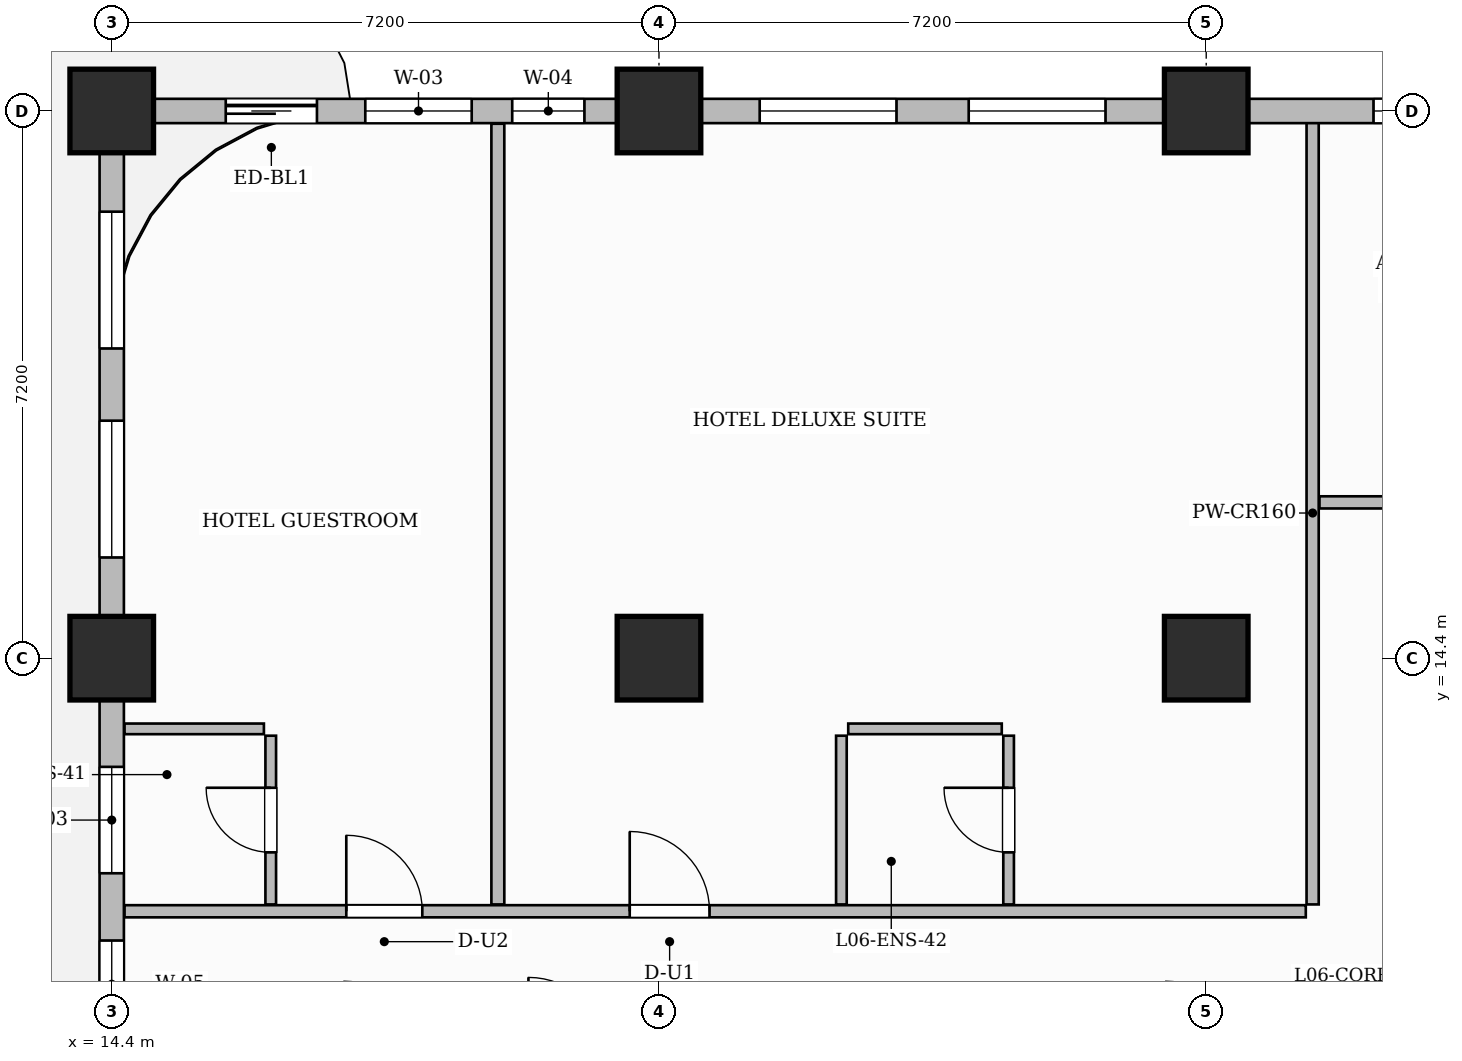
"""IFC4 building model, lengths in metres.
Left out: names, types, materials, properties, quantities, classifications, styles, units other than length and angle.
Written with IfcOpenShell. Run it as: python <this file> out.ifc"""

import sys

from ifc_helpers import new_model, si_unit, direction, frame, frame_2d, origin, origin_2d, place, context, subcontext, project, spatial, rectangle, extrude, source, transform, mapped, element, fill, save


model = new_model("IFC4")
c1 = context("Model", 3, precision=1e-05, world=origin(), true_north=direction((0.0, 1.0)))
c2 = subcontext(c1, "Body", "Model", "MODEL_VIEW")
j1 = project(units=[si_unit("LENGTHUNIT", "METRE"), si_unit("PLANEANGLEUNIT", "RADIAN")], contexts=[c1])
p1 = place(None, origin())
s1 = spatial("IfcSite", under=j1, at=p1, CompositionType="ELEMENT")
p2 = place(p1, origin())
s2 = spatial("IfcBuilding", under=s1, at=p2, CompositionType="ELEMENT")
p3 = place(p2, frame((0.0, 0.0, 32.4)))
s3 = spatial("IfcBuildingStorey", under=s2, at=p3, CompositionType="ELEMENT", Elevation=32.4)
m1 = source(origin(), c2, "Body", "SweptSolid", [
    extrude(rectangle(XDim=1.1, YDim=1.1, at=origin_2d()), origin(), (0.0, 0.0, 1.0), 3.7),
])
for number, where, z_axis, x_axis in (
    (1, (14.4, 14.4, 0.0), (0.0, 0.0, 1.0), (1.0, 0.0, 0.0)),
    (2, (14.4, 21.6, 0.0), (0.0, 0.0, 1.0), (1.0, 0.0, 0.0)),
    (3, (21.6, 14.4, 0.0), (0.0, 0.0, 1.0), (1.0, 0.0, 0.0)),
    (4, (21.6, 21.6, 0.0), (0.0, 0.0, 1.0), (1.0, 0.0, 0.0)),
    (5, (28.8, 14.4, 0.0), (0.0, 0.0, 1.0), (1.0, 0.0, 0.0)),
    (6, (28.8, 21.6, 0.0), (0.0, 0.0, 1.0), (1.0, 0.0, 0.0)),
):
    element("IfcColumn", number, at=place(p3, frame(where, z_axis=z_axis, x_axis=x_axis)), inside=s3, PredefinedType="COLUMN", context=c2, shape_type="MappedRepresentation", body=[
        mapped(m1, transform((0.0, 0.0, 0.0), scale=1.0)),
    ])
p4 = place(p3, frame((14.568, 11.07, 0.0), z_axis=(0.0, 0.0, 1.0), x_axis=(1.0, 0.0, 0.0)))
e7 = element("IfcWall", 7, at=p4, inside=s3, PredefinedType="PARTITIONING", context=c2, shape_type="SweptSolid", body=[
    extrude(rectangle(XDim=15.542, YDim=0.16, at=frame_2d((7.771, 0.0))), origin(), (0.0, 0.0, 1.0), 3.45),
])
p5 = place(p4, frame((2.918, 0.0, 0.0)))
e8 = element("IfcOpeningElement", 8, at=p5, cuts=e7, PredefinedType="OPENING", context=c2, shape_type="SweptSolid", body=[
    extrude(rectangle(XDim=1.0, YDim=2.2, at=frame_2d((0.5, 1.1))), frame((0.0, 0.09, 0.0), z_axis=(0.0, -1.0, 0.0), x_axis=(1.0, 0.0, 0.0)), (0.0, 0.0, 1.0), 0.18),
])
p6 = place(p4, frame((6.647, 0.0, 0.0)))
e9 = element("IfcOpeningElement", 9, at=p6, cuts=e7, PredefinedType="OPENING", context=c2, shape_type="SweptSolid", body=[
    extrude(rectangle(XDim=1.05, YDim=2.25, at=frame_2d((0.525, 1.125))), frame((0.0, 0.09, 0.0), z_axis=(0.0, -1.0, 0.0), x_axis=(1.0, 0.0, 0.0)), (0.0, 0.0, 1.0), 0.18),
])
p7 = place(p3, frame((30.2, 11.16, 0.0), z_axis=(0.0, 0.0, 1.0), x_axis=(0.0, 1.0, 0.0)))
e10 = element("IfcWall", 10, at=p7, inside=s3, PredefinedType="PARTITIONING", context=c2, shape_type="SweptSolid", body=[
    extrude(rectangle(XDim=10.3, YDim=0.16, at=frame_2d((5.15, 0.0))), origin(), (0.0, 0.0, 1.0), 3.45),
])
p8 = place(p3, frame((30.29, 16.45, 0.0), z_axis=(0.0, 0.0, 1.0), x_axis=(1.0, 0.0, 0.0)))
e11 = element("IfcWall", 11, at=p8, inside=s3, PredefinedType="PARTITIONING", context=c2, shape_type="SweptSolid", body=[
    extrude(rectangle(XDim=19.37, YDim=0.16, at=frame_2d((9.685, 0.0))), origin(), (0.0, 0.0, 1.0), 3.45),
])
p9 = place(p8, frame((1.185, 0.0, 0.0)))
e12 = element("IfcOpeningElement", 12, at=p9, cuts=e11, PredefinedType="OPENING", context=c2, shape_type="SweptSolid", body=[
    extrude(rectangle(XDim=0.85, YDim=2.1, at=frame_2d((0.425, 1.05))), frame((0.0, 0.09, 0.0), z_axis=(0.0, -1.0, 0.0), x_axis=(1.0, 0.0, 0.0)), (0.0, 0.0, 1.0), 0.18),
])
p10 = place(p8, frame((6.66, 0.0, 0.0)))
e13 = element("IfcOpeningElement", 13, at=p10, cuts=e11, PredefinedType="OPENING", context=c2, shape_type="SweptSolid", body=[
    extrude(rectangle(XDim=0.9, YDim=2.15, at=frame_2d((0.45, 1.075))), frame((0.0, 0.09, 0.0), z_axis=(0.0, -1.0, 0.0), x_axis=(1.0, 0.0, 0.0)), (0.0, 0.0, 1.0), 0.18),
])
p11 = place(p8, frame((14.46, 0.0, 0.0)))
e14 = element("IfcOpeningElement", 14, at=p11, cuts=e11, PredefinedType="OPENING", context=c2, shape_type="SweptSolid", body=[
    extrude(rectangle(XDim=1.4, YDim=2.35, at=frame_2d((0.7, 1.175))), frame((0.0, 0.09, 0.0), z_axis=(0.0, -1.0, 0.0), x_axis=(1.0, 0.0, 0.0)), (0.0, 0.0, 1.0), 0.18),
])
p12 = place(p3, frame((19.48, 11.16, 0.0), z_axis=(0.0, 0.0, 1.0), x_axis=(0.0, 1.0, 0.0)))
e15 = element("IfcWall", 15, at=p12, inside=s3, PredefinedType="PARTITIONING", context=c2, shape_type="SweptSolid", body=[
    extrude(rectangle(XDim=10.272, YDim=0.17, at=frame_2d((5.136, 0.0))), origin(), (0.0, 0.0, 1.0), 3.45),
])
p13 = place(p3, frame((16.492, 11.16, 0.0), z_axis=(0.0, 0.0, 1.0), x_axis=(0.0, 1.0, 0.0)))
e16 = element("IfcWall", 16, at=p13, inside=s3, PredefinedType="PARTITIONING", context=c2, shape_type="SweptSolid", body=[
    extrude(rectangle(XDim=2.22, YDim=0.14, at=frame_2d((1.11, 0.0))), origin(), (0.0, 0.0, 1.0), 3.45),
])
p14 = place(p13, frame((0.685, 0.0, 0.0)))
e17 = element("IfcOpeningElement", 17, at=p14, cuts=e16, PredefinedType="OPENING", context=c2, shape_type="SweptSolid", body=[
    extrude(rectangle(XDim=0.85, YDim=2.1, at=frame_2d((0.425, 1.05))), frame((0.0, 0.08, 0.0), z_axis=(0.0, -1.0, 0.0), x_axis=(1.0, 0.0, 0.0)), (0.0, 0.0, 1.0), 0.16),
])
p15 = place(p3, frame((14.568, 13.47, 0.0), z_axis=(0.0, 0.0, 1.0), x_axis=(1.0, 0.0, 0.0)))
e18 = element("IfcWall", 18, at=p15, inside=s3, PredefinedType="PARTITIONING", context=c2, shape_type="SweptSolid", body=[
    extrude(rectangle(XDim=1.834, YDim=0.14, at=frame_2d((0.917, 0.0))), origin(), (0.0, 0.0, 1.0), 3.45),
])
p16 = place(p3, frame((24.0, 11.16, 0.0), z_axis=(0.0, 0.0, 1.0), x_axis=(0.0, 1.0, 0.0)))
e19 = element("IfcWall", 19, at=p16, inside=s3, PredefinedType="PARTITIONING", context=c2, shape_type="SweptSolid", body=[
    extrude(rectangle(XDim=2.22, YDim=0.14, at=frame_2d((1.11, 0.0))), origin(), (0.0, 0.0, 1.0), 3.45),
])
p17 = place(p3, frame((26.2, 11.16, 0.0), z_axis=(0.0, 0.0, 1.0), x_axis=(0.0, 1.0, 0.0)))
e20 = element("IfcWall", 20, at=p17, inside=s3, PredefinedType="PARTITIONING", context=c2, shape_type="SweptSolid", body=[
    extrude(rectangle(XDim=2.22, YDim=0.14, at=frame_2d((1.11, 0.0))), origin(), (0.0, 0.0, 1.0), 3.45),
])
p18 = place(p17, frame((0.685, 0.0, 0.0)))
e21 = element("IfcOpeningElement", 21, at=p18, cuts=e20, PredefinedType="OPENING", context=c2, shape_type="SweptSolid", body=[
    extrude(rectangle(XDim=0.85, YDim=2.1, at=frame_2d((0.425, 1.05))), frame((0.0, 0.08, 0.0), z_axis=(0.0, -1.0, 0.0), x_axis=(1.0, 0.0, 0.0)), (0.0, 0.0, 1.0), 0.16),
])
p19 = place(p3, frame((24.09, 13.47, 0.0), z_axis=(0.0, 0.0, 1.0), x_axis=(1.0, 0.0, 0.0)))
e22 = element("IfcWall", 22, at=p19, inside=s3, PredefinedType="PARTITIONING", context=c2, shape_type="SweptSolid", body=[
    extrude(rectangle(XDim=2.02, YDim=0.14, at=frame_2d((1.01, 0.0))), origin(), (0.0, 0.0, 1.0), 3.45),
])
p20 = place(p3, frame((14.4, 21.6, 0.0), z_axis=(0.0, 0.0, 1.0), x_axis=(1.0, 0.0, 0.0)))
e23 = element("IfcWall", 23, at=p20, inside=s3, PredefinedType="SOLIDWALL", context=c2, shape_type="SweptSolid", body=[
    extrude(rectangle(XDim=43.2, YDim=0.32, at=frame_2d((21.6, 0.0))), origin(), (0.0, 0.0, 1.0), 2.885),
])
p21 = place(p20, frame((1.5, 0.0, 0.0)))
e24 = element("IfcOpeningElement", 24, at=p21, cuts=e23, PredefinedType="OPENING", context=c2, shape_type="SweptSolid", body=[
    extrude(rectangle(XDim=1.2, YDim=2.2, at=frame_2d((0.6, 1.1))), frame((0.0, 0.17, 0.0), z_axis=(0.0, -1.0, 0.0), x_axis=(1.0, 0.0, 0.0)), (0.0, 0.0, 1.0), 0.34),
])
p22 = place(p20, frame((3.336, 0.0, 0.8)))
e25 = element("IfcOpeningElement", 25, at=p22, cuts=e23, PredefinedType="OPENING", context=c2, shape_type="SweptSolid", body=[
    extrude(rectangle(XDim=1.4, YDim=1.85, at=frame_2d((0.7, 0.925))), frame((0.0, 0.17, 0.0), z_axis=(0.0, -1.0, 0.0), x_axis=(1.0, 0.0, 0.0)), (0.0, 0.0, 1.0), 0.34),
])
p23 = place(p20, frame((5.269, 0.0, 0.8)))
e26 = element("IfcOpeningElement", 26, at=p23, cuts=e23, PredefinedType="OPENING", context=c2, shape_type="SweptSolid", body=[
    extrude(rectangle(XDim=0.95, YDim=1.75, at=frame_2d((0.475, 0.875))), frame((0.0, 0.17, 0.0), z_axis=(0.0, -1.0, 0.0), x_axis=(1.0, 0.0, 0.0)), (0.0, 0.0, 1.0), 0.34),
])
p24 = place(p20, frame((8.525, 0.0, 0.8)))
e27 = element("IfcOpeningElement", 27, at=p24, cuts=e23, PredefinedType="OPENING", context=c2, shape_type="SweptSolid", body=[
    extrude(rectangle(XDim=1.8, YDim=1.85, at=frame_2d((0.9, 0.925))), frame((0.0, 0.17, 0.0), z_axis=(0.0, -1.0, 0.0), x_axis=(1.0, 0.0, 0.0)), (0.0, 0.0, 1.0), 0.34),
])
p25 = place(p20, frame((11.275, 0.0, 0.8)))
e28 = element("IfcOpeningElement", 28, at=p25, cuts=e23, PredefinedType="OPENING", context=c2, shape_type="SweptSolid", body=[
    extrude(rectangle(XDim=1.8, YDim=1.85, at=frame_2d((0.9, 0.925))), frame((0.0, 0.17, 0.0), z_axis=(0.0, -1.0, 0.0), x_axis=(1.0, 0.0, 0.0)), (0.0, 0.0, 1.0), 0.34),
])
p26 = place(p20, frame((16.601, 0.0, 0.8)))
e29 = element("IfcOpeningElement", 29, at=p26, cuts=e23, PredefinedType="OPENING", context=c2, shape_type="SweptSolid", body=[
    extrude(rectangle(XDim=1.8, YDim=1.85, at=frame_2d((0.9, 0.925))), frame((0.0, 0.17, 0.0), z_axis=(0.0, -1.0, 0.0), x_axis=(1.0, 0.0, 0.0)), (0.0, 0.0, 1.0), 0.34),
])
p27 = place(p20, frame((21.723, 0.0, 0.8)))
e30 = element("IfcOpeningElement", 30, at=p27, cuts=e23, PredefinedType="OPENING", context=c2, shape_type="SweptSolid", body=[
    extrude(rectangle(XDim=1.8, YDim=1.85, at=frame_2d((0.9, 0.925))), frame((0.0, 0.17, 0.0), z_axis=(0.0, -1.0, 0.0), x_axis=(1.0, 0.0, 0.0)), (0.0, 0.0, 1.0), 0.34),
])
p28 = place(p20, frame((24.469, 0.0, 0.8)))
e31 = element("IfcOpeningElement", 31, at=p28, cuts=e23, PredefinedType="OPENING", context=c2, shape_type="SweptSolid", body=[
    extrude(rectangle(XDim=1.8, YDim=1.85, at=frame_2d((0.9, 0.925))), frame((0.0, 0.17, 0.0), z_axis=(0.0, -1.0, 0.0), x_axis=(1.0, 0.0, 0.0)), (0.0, 0.0, 1.0), 0.34),
])
p29 = place(p20, frame((29.075, 0.0, 0.8)))
e32 = element("IfcOpeningElement", 32, at=p29, cuts=e23, PredefinedType="OPENING", context=c2, shape_type="SweptSolid", body=[
    extrude(rectangle(XDim=1.8, YDim=1.85, at=frame_2d((0.9, 0.925))), frame((0.0, 0.17, 0.0), z_axis=(0.0, -1.0, 0.0), x_axis=(1.0, 0.0, 0.0)), (0.0, 0.0, 1.0), 0.34),
])
p30 = place(p20, frame((32.125, 0.0, 0.8)))
e33 = element("IfcOpeningElement", 33, at=p30, cuts=e23, PredefinedType="OPENING", context=c2, shape_type="SweptSolid", body=[
    extrude(rectangle(XDim=1.8, YDim=1.85, at=frame_2d((0.9, 0.925))), frame((0.0, 0.17, 0.0), z_axis=(0.0, -1.0, 0.0), x_axis=(1.0, 0.0, 0.0)), (0.0, 0.0, 1.0), 0.34),
])
p31 = place(p20, frame((36.875, 0.0, 0.8)))
e34 = element("IfcOpeningElement", 34, at=p31, cuts=e23, PredefinedType="OPENING", context=c2, shape_type="SweptSolid", body=[
    extrude(rectangle(XDim=1.8, YDim=1.85, at=frame_2d((0.9, 0.925))), frame((0.0, 0.17, 0.0), z_axis=(0.0, -1.0, 0.0), x_axis=(1.0, 0.0, 0.0)), (0.0, 0.0, 1.0), 0.34),
])
p32 = place(p20, frame((39.925, 0.0, 0.8)))
e35 = element("IfcOpeningElement", 35, at=p32, cuts=e23, PredefinedType="OPENING", context=c2, shape_type="SweptSolid", body=[
    extrude(rectangle(XDim=1.8, YDim=1.85, at=frame_2d((0.9, 0.925))), frame((0.0, 0.17, 0.0), z_axis=(0.0, -1.0, 0.0), x_axis=(1.0, 0.0, 0.0)), (0.0, 0.0, 1.0), 0.34),
])
p33 = place(p3, frame((14.4, 0.05, 0.0), z_axis=(0.0, 0.0, 1.0), x_axis=(0.0, 1.0, 0.0)))
e36 = element("IfcWall", 36, at=p33, inside=s3, PredefinedType="SOLIDWALL", context=c2, shape_type="SweptSolid", body=[
    extrude(rectangle(XDim=21.5, YDim=0.32, at=frame_2d((10.75, 0.0))), origin(), (0.0, 0.0, 1.0), 2.885),
])
p34 = place(p33, frame((1.275, 0.0, 0.8)))
e37 = element("IfcOpeningElement", 37, at=p34, cuts=e36, PredefinedType="OPENING", context=c2, shape_type="SweptSolid", body=[
    extrude(rectangle(XDim=1.8, YDim=1.85, at=frame_2d((0.9, 0.925))), frame((0.0, 0.17, 0.0), z_axis=(0.0, -1.0, 0.0), x_axis=(1.0, 0.0, 0.0)), (0.0, 0.0, 1.0), 0.34),
])
p35 = place(p33, frame((4.025, 0.0, 0.8)))
e38 = element("IfcOpeningElement", 38, at=p35, cuts=e36, PredefinedType="OPENING", context=c2, shape_type="SweptSolid", body=[
    extrude(rectangle(XDim=1.8, YDim=1.85, at=frame_2d((0.9, 0.925))), frame((0.0, 0.17, 0.0), z_axis=(0.0, -1.0, 0.0), x_axis=(1.0, 0.0, 0.0)), (0.0, 0.0, 1.0), 0.34),
])
p36 = place(p33, frame((9.485, 0.0, 0.8)))
e39 = element("IfcOpeningElement", 39, at=p36, cuts=e36, PredefinedType="OPENING", context=c2, shape_type="SweptSolid", body=[
    extrude(rectangle(XDim=1.15, YDim=1.8, at=frame_2d((0.575, 0.9))), frame((0.0, 0.17, 0.0), z_axis=(0.0, -1.0, 0.0), x_axis=(1.0, 0.0, 0.0)), (0.0, 0.0, 1.0), 0.34),
])
p37 = place(p33, frame((11.52, 0.0, 0.8)))
e40 = element("IfcOpeningElement", 40, at=p37, cuts=e36, PredefinedType="OPENING", context=c2, shape_type="SweptSolid", body=[
    extrude(rectangle(XDim=1.4, YDim=1.85, at=frame_2d((0.7, 0.925))), frame((0.0, 0.17, 0.0), z_axis=(0.0, -1.0, 0.0), x_axis=(1.0, 0.0, 0.0)), (0.0, 0.0, 1.0), 0.34),
])
p38 = place(p33, frame((15.675, 0.0, 0.8)))
e41 = element("IfcOpeningElement", 41, at=p38, cuts=e36, PredefinedType="OPENING", context=c2, shape_type="SweptSolid", body=[
    extrude(rectangle(XDim=1.8, YDim=1.85, at=frame_2d((0.9, 0.925))), frame((0.0, 0.17, 0.0), z_axis=(0.0, -1.0, 0.0), x_axis=(1.0, 0.0, 0.0)), (0.0, 0.0, 1.0), 0.34),
])
p39 = place(p33, frame((18.425, 0.0, 0.8)))
e42 = element("IfcOpeningElement", 42, at=p39, cuts=e36, PredefinedType="OPENING", context=c2, shape_type="SweptSolid", body=[
    extrude(rectangle(XDim=1.8, YDim=1.85, at=frame_2d((0.9, 0.925))), frame((0.0, 0.17, 0.0), z_axis=(0.0, -1.0, 0.0), x_axis=(1.0, 0.0, 0.0)), (0.0, 0.0, 1.0), 0.34),
])
m2 = source(origin(), c2, "Body", "SweptSolid", [
    extrude(rectangle(XDim=0.85, YDim=2.1, at=frame_2d((0.425, 1.05))), frame((0.0, 0.025, 0.0), z_axis=(0.0, -1.0, 0.0), x_axis=(1.0, 0.0, 0.0)), (0.0, 0.0, 1.0), 0.05),
])
p40 = place(p14, origin())
e43 = element("IfcDoor", 43, at=p40, inside=s3, OperationType="SINGLE_SWING_RIGHT", PredefinedType="DOOR", context=c2, shape_type="MappedRepresentation", body=[
    mapped(m2, transform((0.0, 0.0, 0.0), scale=1.0)),
])
fill(e17, e43)
m3 = source(origin(), c2, "Body", "SweptSolid", [
    extrude(rectangle(XDim=1.0, YDim=2.2, at=frame_2d((0.5, 1.1))), frame((0.0, 0.025, 0.0), z_axis=(0.0, -1.0, 0.0), x_axis=(1.0, 0.0, 0.0)), (0.0, 0.0, 1.0), 0.05),
])
p41 = place(p5, origin())
e44 = element("IfcDoor", 44, at=p41, inside=s3, OperationType="SINGLE_SWING_LEFT", PredefinedType="DOOR", context=c2, shape_type="MappedRepresentation", body=[
    mapped(m3, transform((0.0, 0.0, 0.0), scale=1.0)),
])
fill(e8, e44)
p42 = place(p18, origin())
e45 = element("IfcDoor", 45, at=p42, inside=s3, OperationType="SINGLE_SWING_RIGHT", PredefinedType="DOOR", context=c2, shape_type="MappedRepresentation", body=[
    mapped(m2, transform((0.0, 0.0, 0.0), scale=1.0)),
])
fill(e21, e45)
m4 = source(origin(), c2, "Body", "SweptSolid", [
    extrude(rectangle(XDim=1.05, YDim=2.25, at=frame_2d((0.525, 1.125))), frame((0.0, 0.025, 0.0), z_axis=(0.0, -1.0, 0.0), x_axis=(1.0, 0.0, 0.0)), (0.0, 0.0, 1.0), 0.05),
])
p43 = place(p6, origin())
e46 = element("IfcDoor", 46, at=p43, inside=s3, OperationType="SINGLE_SWING_LEFT", PredefinedType="DOOR", context=c2, shape_type="MappedRepresentation", body=[
    mapped(m4, transform((0.0, 0.0, 0.0), scale=1.0)),
])
fill(e9, e46)
m5 = source(origin(), c2, "Body", "SweptSolid", [
    extrude(rectangle(XDim=1.2, YDim=2.2, at=frame_2d((0.6, 1.1))), frame((0.0, 0.025, 0.0), z_axis=(0.0, -1.0, 0.0), x_axis=(1.0, 0.0, 0.0)), (0.0, 0.0, 1.0), 0.05),
])
p44 = place(p21, origin())
e47 = element("IfcDoor", 47, at=p44, inside=s3, OperationType="SLIDING_TO_LEFT", PredefinedType="DOOR", context=c2, shape_type="MappedRepresentation", body=[
    mapped(m5, transform((0.0, 0.0, 0.0), scale=1.0)),
])
fill(e24, e47)
m6 = source(origin(), c2, "Body", "SweptSolid", [
    extrude(rectangle(XDim=1.4, YDim=1.85, at=frame_2d((0.7, 0.925))), frame((0.0, 0.03, 0.0), z_axis=(0.0, -1.0, 0.0), x_axis=(1.0, 0.0, 0.0)), (0.0, 0.0, 1.0), 0.06),
])
p45 = place(p22, origin())
e48 = element("IfcWindow", 48, at=p45, inside=s3, PartitioningType="SINGLE_PANEL", PredefinedType="WINDOW", context=c2, shape_type="MappedRepresentation", body=[
    mapped(m6, transform((0.0, 0.0, 0.0), scale=1.0)),
])
fill(e25, e48)
m7 = source(origin(), c2, "Body", "SweptSolid", [
    extrude(rectangle(XDim=0.95, YDim=1.75, at=frame_2d((0.475, 0.875))), frame((0.0, 0.03, 0.0), z_axis=(0.0, -1.0, 0.0), x_axis=(1.0, 0.0, 0.0)), (0.0, 0.0, 1.0), 0.06),
])
p46 = place(p23, origin())
e49 = element("IfcWindow", 49, at=p46, inside=s3, PartitioningType="SINGLE_PANEL", PredefinedType="WINDOW", context=c2, shape_type="MappedRepresentation", body=[
    mapped(m7, transform((0.0, 0.0, 0.0), scale=1.0)),
])
fill(e26, e49)
m8 = source(origin(), c2, "Body", "SweptSolid", [
    extrude(rectangle(XDim=1.8, YDim=1.85, at=frame_2d((0.9, 0.925))), frame((0.0, 0.03, 0.0), z_axis=(0.0, -1.0, 0.0), x_axis=(1.0, 0.0, 0.0)), (0.0, 0.0, 1.0), 0.06),
])
p47 = place(p24, origin())
e50 = element("IfcWindow", 50, at=p47, inside=s3, PartitioningType="DOUBLE_PANEL_VERTICAL", PredefinedType="WINDOW", context=c2, shape_type="MappedRepresentation", body=[
    mapped(m8, transform((0.0, 0.0, 0.0), scale=1.0)),
])
fill(e27, e50)
p48 = place(p25, origin())
e51 = element("IfcWindow", 51, at=p48, inside=s3, PartitioningType="DOUBLE_PANEL_VERTICAL", PredefinedType="WINDOW", context=c2, shape_type="MappedRepresentation", body=[
    mapped(m8, transform((0.0, 0.0, 0.0), scale=1.0)),
])
fill(e28, e51)
p49 = place(p26, origin())
e52 = element("IfcWindow", 52, at=p49, inside=s3, PartitioningType="DOUBLE_PANEL_VERTICAL", PredefinedType="WINDOW", context=c2, shape_type="MappedRepresentation", body=[
    mapped(m8, transform((0.0, 0.0, 0.0), scale=1.0)),
])
fill(e29, e52)
m9 = source(origin(), c2, "Body", "SweptSolid", [
    extrude(rectangle(XDim=1.15, YDim=1.8, at=frame_2d((0.575, 0.9))), frame((0.0, 0.03, 0.0), z_axis=(0.0, -1.0, 0.0), x_axis=(1.0, 0.0, 0.0)), (0.0, 0.0, 1.0), 0.06),
])
p50 = place(p36, origin())
e53 = element("IfcWindow", 53, at=p50, inside=s3, PartitioningType="SINGLE_PANEL", PredefinedType="WINDOW", context=c2, shape_type="MappedRepresentation", body=[
    mapped(m9, transform((0.0, 0.0, 0.0), scale=1.0)),
])
fill(e39, e53)
p51 = place(p37, origin())
e54 = element("IfcWindow", 54, at=p51, inside=s3, PartitioningType="SINGLE_PANEL", PredefinedType="WINDOW", context=c2, shape_type="MappedRepresentation", body=[
    mapped(m6, transform((0.0, 0.0, 0.0), scale=1.0)),
])
fill(e40, e54)
p52 = place(p38, origin())
e55 = element("IfcWindow", 55, at=p52, inside=s3, PartitioningType="DOUBLE_PANEL_VERTICAL", PredefinedType="WINDOW", context=c2, shape_type="MappedRepresentation", body=[
    mapped(m8, transform((0.0, 0.0, 0.0), scale=1.0)),
])
fill(e41, e55)
p53 = place(p39, origin())
e56 = element("IfcWindow", 56, at=p53, inside=s3, PartitioningType="DOUBLE_PANEL_VERTICAL", PredefinedType="WINDOW", context=c2, shape_type="MappedRepresentation", body=[
    mapped(m8, transform((0.0, 0.0, 0.0), scale=1.0)),
])
fill(e42, e56)
save(model, sys.argv[1])
